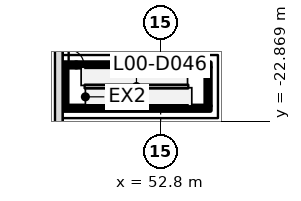
"""IFC4 building model, lengths in metres.
Left out: names, types, materials, properties, quantities, classifications, styles, units other than length and angle.
Written with IfcOpenShell. Run it as: python <this file> out.ifc"""

import sys

from ifc_helpers import new_model, si_unit, direction, frame, frame_2d, origin, place, context, subcontext, project, spatial, rectangle, extrude, element, fill, save


model = new_model("IFC4")
c1 = context("Model", 3, precision=1e-05, world=origin(), true_north=direction((0.0, 1.0)))
c2 = subcontext(c1, "Body", "Model", "MODEL_VIEW")
j1 = project(units=[si_unit("LENGTHUNIT", "METRE"), si_unit("PLANEANGLEUNIT", "RADIAN")], contexts=[c1])
p1 = place(None, origin())
s1 = spatial("IfcSite", under=j1, at=p1, CompositionType="ELEMENT")
p2 = place(p1, origin())
s2 = spatial("IfcBuilding", under=s1, at=p2, CompositionType="ELEMENT")
p3 = place(p2, origin())
s3 = spatial("IfcBuildingStorey", under=s2, at=p3, CompositionType="ELEMENT", Elevation=0.0)
p4 = place(p3, frame((46.097, -15.676, 0.0), z_axis=(0.0, 0.0, 1.0), x_axis=(0.00042159659, -0.999999911128, 0.0)))
e1 = element("IfcWall", 1, at=p4, inside=s3, PredefinedType="STANDARD", context=c2, shape_type="SweptSolid", body=[
    extrude(rectangle(XDim=17.952, YDim=0.5, at=frame_2d((8.976, 0.0))), origin(), (0.0, 0.0, 1.0), 8.75),
])
p5 = place(p4, frame((7.85, 0.0, 0.0)))
e2 = element("IfcOpeningElement", 2, at=p5, cuts=e1, PredefinedType="OPENING", context=c2, shape_type="SweptSolid", body=[
    extrude(rectangle(XDim=2.4, YDim=2.8, at=frame_2d((1.2, 1.4))), frame((0.0, 0.25, 0.0), z_axis=(0.0, -1.0, 0.0), x_axis=(1.0, 0.0, 0.0)), (0.0, 0.0, 1.0), 0.5),
])
p6 = place(p3, frame((46.349, -19.175, 0.0), z_axis=(0.0, 0.0, 1.0), x_axis=(1.0, 0.0, 0.0)))
e3 = element("IfcWall", 3, at=p6, inside=s3, PredefinedType="STANDARD", context=c2, shape_type="SweptSolid", body=[
    extrude(rectangle(XDim=9.72, YDim=0.3, at=frame_2d((4.86, 0.0))), origin(), (0.0, 0.0, 1.0), 12.2),
])
p7 = place(p6, frame((0.4, 0.0, 0.0)))
e4 = element("IfcOpeningElement", 4, at=p7, cuts=e3, PredefinedType="OPENING", context=c2, shape_type="SweptSolid", body=[
    extrude(rectangle(XDim=1.0, YDim=2.1, at=frame_2d((0.5, 1.05))), frame((0.0, 0.15, 0.0), z_axis=(0.0, -1.0, 0.0), x_axis=(1.0, 0.0, 0.0)), (0.0, 0.0, 1.0), 0.3),
])
p8 = place(p3, frame((46.349, -22.025, 0.0), z_axis=(0.0, 0.0, 1.0), x_axis=(1.0, 0.0, 0.0)))
e5 = element("IfcWall", 5, at=p8, inside=s3, PredefinedType="STANDARD", context=c2, shape_type="SweptSolid", body=[
    extrude(rectangle(XDim=9.72, YDim=0.3, at=frame_2d((4.86, 0.0))), origin(), (0.0, 0.0, 1.0), 12.2),
])
p9 = place(p3, frame((55.919, -21.875, 0.0), z_axis=(0.0, 0.0, 1.0), x_axis=(0.0, 1.0, 0.0)))
e6 = element("IfcWall", 6, at=p9, inside=s3, PredefinedType="STANDARD", context=c2, shape_type="SweptSolid", body=[
    extrude(rectangle(XDim=2.55, YDim=0.3, at=frame_2d((1.275, 0.0))), origin(), (0.0, 0.0, 1.0), 12.2),
])
p10 = place(p3, frame((46.499, -21.875, 0.0), z_axis=(0.0, 0.0, 1.0), x_axis=(0.0, 1.0, 0.0)))
e7 = element("IfcWall", 7, at=p10, inside=s3, PredefinedType="STANDARD", context=c2, shape_type="SweptSolid", body=[
    extrude(rectangle(XDim=2.55, YDim=0.3, at=frame_2d((1.275, 0.0))), origin(), (0.0, 0.0, 1.0), 9.0),
])
p11 = place(p7, origin())
e8 = element("IfcDoor", 8, at=p11, inside=s3, OperationType="SINGLE_SWING_RIGHT", PredefinedType="DOOR", context=c2, shape_type="SweptSolid", body=[
    extrude(rectangle(XDim=1.0, YDim=2.1, at=frame_2d((0.5, 1.05))), frame((0.0, 0.025, 0.0), z_axis=(0.0, -1.0, 0.0), x_axis=(1.0, 0.0, 0.0)), (0.0, 0.0, 1.0), 0.05),
])
fill(e4, e8)
save(model, sys.argv[1])
